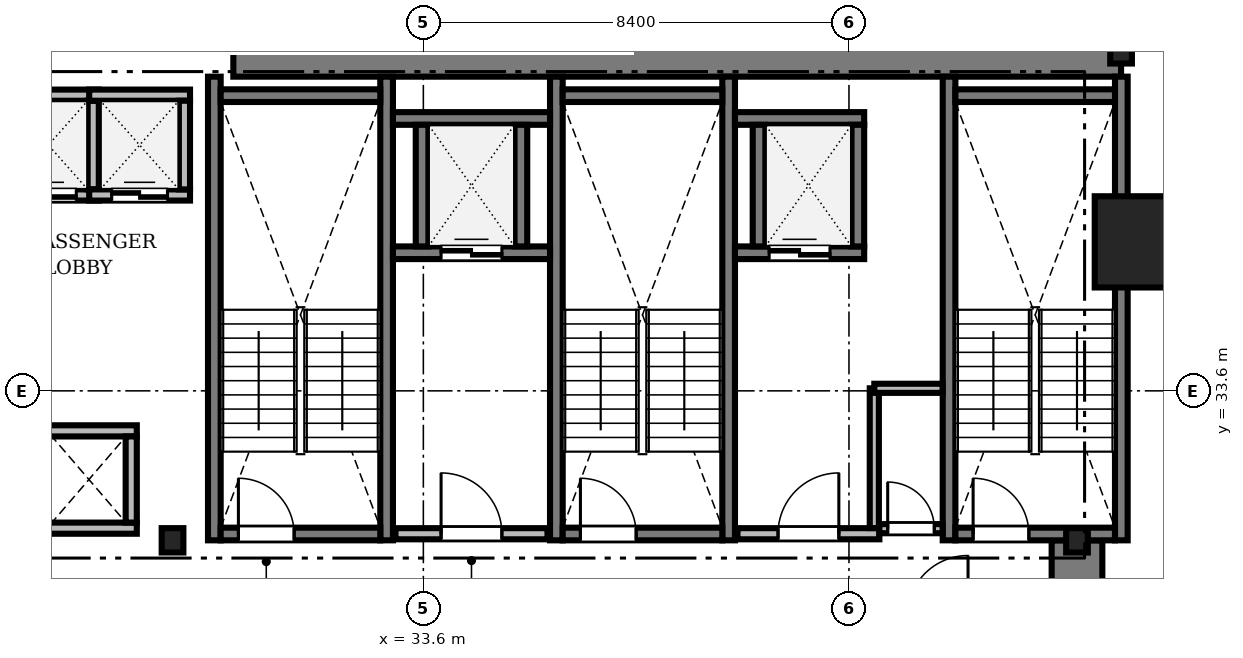
"""IFC4 building model, lengths in metres.
Left out: names, types, materials, properties, quantities, classifications, styles, units other than length and angle.
Written with IfcOpenShell. Run it as: python <this file> out.ifc"""

import sys

from ifc_helpers import new_model, si_unit, direction, frame, frame_2d, origin, origin_2d, place, context, subcontext, project, spatial, rectangle, i_section, extrude, source, transform, mapped, element, fill, save


model = new_model("IFC4")
c1 = context("Model", 3, precision=1e-05, world=origin(), true_north=direction((0.0, 1.0)))
c2 = subcontext(c1, "Body", "Model", "MODEL_VIEW")
j1 = project(units=[si_unit("LENGTHUNIT", "METRE"), si_unit("PLANEANGLEUNIT", "RADIAN")], contexts=[c1])
p1 = place(None, origin())
s1 = spatial("IfcSite", under=j1, at=p1, CompositionType="ELEMENT")
p2 = place(p1, origin())
s2 = spatial("IfcBuilding", under=s1, at=p2, CompositionType="ELEMENT")
p3 = place(p2, frame((0.0, 0.0, 71.4)))
s3 = spatial("IfcBuildingStorey", under=s2, at=p3, CompositionType="ELEMENT", Elevation=71.4)
m1 = source(origin(), c2, "Body", "SweptSolid", [
    extrude(rectangle(XDim=17.52, YDim=1.0, at=frame_2d((8.76, 0.0))), origin(), (0.0, 0.0, 1.0), 3.41),
])
p4 = place(p3, frame((29.85, 40.3, 0.0), z_axis=(0.0, 0.0, 1.0), x_axis=(1.0, 0.0, 0.0)))
e1 = element("IfcWall", 1, at=p4, inside=s3, PredefinedType="SHEAR", context=c2, shape_type="MappedRepresentation", body=[
    mapped(m1, transform((0.0, 0.0, 0.0), scale=1.0)),
])
m2 = source(origin(), c2, "Body", "SweptSolid", [
    extrude(rectangle(XDim=13.15, YDim=1.0, at=frame_2d((6.575, 0.0))), origin(), (0.0, 0.0, 1.0), 3.41),
])
p5 = place(p3, frame((46.5, 17.5, 0.0), z_axis=(0.0, 0.0, 1.0), x_axis=(0.0, 1.0, 0.0)))
e2 = element("IfcWall", 2, at=p5, inside=s3, PredefinedType="SHEAR", context=c2, shape_type="MappedRepresentation", body=[
    mapped(m2, transform((0.0, 0.0, 0.0), scale=1.0)),
])
m3 = source(origin(), c2, "Body", "SweptSolid", [
    extrude(i_section(OverallWidth=0.428, OverallDepth=0.481, WebThickness=0.04, FlangeThickness=0.063, FilletRadius=0.015, at=origin_2d()), origin(), (0.0, 0.0, 1.0), 3.41),
])
for number, where, z_axis, x_axis in (
    (3, (28.65, 30.65, 0.0), (0.0, 0.0, 1.0), (1.0, 0.0, 0.0)),
    (4, (46.5, 30.65, 0.0), (0.0, 0.0, 1.0), (1.0, 0.0, 0.0)),
    (5, (47.37, 40.3, 0.0), (0.0, 0.0, 1.0), (1.0, 0.0, 0.0)),
):
    element("IfcColumn", number, at=place(p3, frame(where, z_axis=z_axis, x_axis=x_axis)), inside=s3, PredefinedType="COLUMN", context=c2, shape_type="MappedRepresentation", body=[
        mapped(m3, transform((0.0, 0.0, 0.0), scale=1.0)),
    ])
m4 = source(origin(), c2, "Body", "SweptSolid", [
    extrude(rectangle(XDim=1.8, YDim=1.8, at=origin_2d()), origin(), (0.0, 0.0, 1.0), 3.41),
])
p6 = place(p3, frame((47.75, 36.54, 0.0), z_axis=(0.0, 0.0, 1.0), x_axis=(1.0, 0.0, 0.0)))
e6 = element("IfcColumn", 6, at=p6, inside=s3, PredefinedType="COLUMN", context=c2, shape_type="MappedRepresentation", body=[
    mapped(m4, transform((0.0, 0.0, 0.0), scale=1.0)),
])
m5 = source(origin(), c2, "Body", "SweptSolid", [
    extrude(rectangle(XDim=9.15, YDim=0.25, at=frame_2d((4.575, 0.0))), origin(), (0.0, 0.0, 1.0), 3.45),
])
for number, where, z_axis, x_axis in (
    (7, (29.475, 30.65, 0.0), (0.0, 0.0, 1.0), (0.0, 1.0, 0.0)),
    (8, (32.875, 30.65, 0.0), (0.0, 0.0, 1.0), (0.0, 1.0, 0.0)),
):
    element("IfcWall", number, at=place(p3, frame(where, z_axis=z_axis, x_axis=x_axis)), inside=s3, PredefinedType="SOLIDWALL", context=c2, shape_type="MappedRepresentation", body=[
        mapped(m5, transform((0.0, 0.0, 0.0), scale=1.0)),
    ])
m6 = source(origin(), c2, "Body", "SweptSolid", [
    extrude(rectangle(XDim=3.15, YDim=0.25, at=frame_2d((1.575, 0.0))), origin(), (0.0, 0.0, 1.0), 3.45),
])
p7 = place(p3, frame((29.6, 39.425, 0.0), z_axis=(0.0, 0.0, 1.0), x_axis=(1.0, 0.0, 0.0)))
e9 = element("IfcWall", 9, at=p7, inside=s3, PredefinedType="SOLIDWALL", context=c2, shape_type="MappedRepresentation", body=[
    mapped(m6, transform((0.0, 0.0, 0.0), scale=1.0)),
])
p8 = place(p3, frame((29.6, 30.775, 0.0), z_axis=(0.0, 0.0, 1.0), x_axis=(1.0, 0.0, 0.0)))
e10 = element("IfcWall", 10, at=p8, inside=s3, PredefinedType="SOLIDWALL", context=c2, shape_type="MappedRepresentation", body=[
    mapped(m6, transform((0.0, 0.0, 0.0), scale=1.0)),
])
m7 = source(origin(), c2, "Body", "SweptSolid", [
    extrude(rectangle(XDim=1.1, YDim=2.2, at=frame_2d((0.55, 1.1))), frame((0.0, 0.135, 0.0), z_axis=(0.0, -1.0, 0.0), x_axis=(1.0, 0.0, 0.0)), (0.0, 0.0, 1.0), 0.27),
])
p9 = place(p8, frame((0.35, 0.0, 0.0)))
e11 = element("IfcOpeningElement", 11, at=p9, cuts=e10, PredefinedType="OPENING", context=c2, shape_type="MappedRepresentation", body=[
    mapped(m7, transform((0.0, 0.0, 0.0), scale=1.0)),
])
for number, where, z_axis, x_axis in (
    (12, (36.225, 30.65, 0.0), (0.0, 0.0, 1.0), (0.0, 1.0, 0.0)),
    (13, (39.625, 30.65, 0.0), (0.0, 0.0, 1.0), (0.0, 1.0, 0.0)),
):
    element("IfcWall", number, at=place(p3, frame(where, z_axis=z_axis, x_axis=x_axis)), inside=s3, PredefinedType="SOLIDWALL", context=c2, shape_type="MappedRepresentation", body=[
        mapped(m5, transform((0.0, 0.0, 0.0), scale=1.0)),
    ])
p10 = place(p3, frame((36.35, 39.425, 0.0), z_axis=(0.0, 0.0, 1.0), x_axis=(1.0, 0.0, 0.0)))
e14 = element("IfcWall", 14, at=p10, inside=s3, PredefinedType="SOLIDWALL", context=c2, shape_type="MappedRepresentation", body=[
    mapped(m6, transform((0.0, 0.0, 0.0), scale=1.0)),
])
p11 = place(p3, frame((36.35, 30.775, 0.0), z_axis=(0.0, 0.0, 1.0), x_axis=(1.0, 0.0, 0.0)))
e15 = element("IfcWall", 15, at=p11, inside=s3, PredefinedType="SOLIDWALL", context=c2, shape_type="MappedRepresentation", body=[
    mapped(m6, transform((0.0, 0.0, 0.0), scale=1.0)),
])
p12 = place(p11, frame((0.35, 0.0, 0.0)))
e16 = element("IfcOpeningElement", 16, at=p12, cuts=e15, PredefinedType="OPENING", context=c2, shape_type="MappedRepresentation", body=[
    mapped(m7, transform((0.0, 0.0, 0.0), scale=1.0)),
])
for number, where, z_axis, x_axis in (
    (17, (43.975, 30.65, 0.0), (0.0, 0.0, 1.0), (0.0, 1.0, 0.0)),
    (18, (47.375, 30.65, 0.0), (0.0, 0.0, 1.0), (0.0, 1.0, 0.0)),
):
    element("IfcWall", number, at=place(p3, frame(where, z_axis=z_axis, x_axis=x_axis)), inside=s3, PredefinedType="SOLIDWALL", context=c2, shape_type="MappedRepresentation", body=[
        mapped(m5, transform((0.0, 0.0, 0.0), scale=1.0)),
    ])
p13 = place(p3, frame((44.1, 39.425, 0.0), z_axis=(0.0, 0.0, 1.0), x_axis=(1.0, 0.0, 0.0)))
e19 = element("IfcWall", 19, at=p13, inside=s3, PredefinedType="SOLIDWALL", context=c2, shape_type="MappedRepresentation", body=[
    mapped(m6, transform((0.0, 0.0, 0.0), scale=1.0)),
])
p14 = place(p3, frame((44.1, 30.775, 0.0), z_axis=(0.0, 0.0, 1.0), x_axis=(1.0, 0.0, 0.0)))
e20 = element("IfcWall", 20, at=p14, inside=s3, PredefinedType="SOLIDWALL", context=c2, shape_type="MappedRepresentation", body=[
    mapped(m6, transform((0.0, 0.0, 0.0), scale=1.0)),
])
p15 = place(p14, frame((0.35, 0.0, 0.0)))
e21 = element("IfcOpeningElement", 21, at=p15, cuts=e20, PredefinedType="OPENING", context=c2, shape_type="MappedRepresentation", body=[
    mapped(m7, transform((0.0, 0.0, 0.0), scale=1.0)),
])
m8 = source(origin(), c2, "Body", "SweptSolid", [
    extrude(rectangle(XDim=3.0, YDim=0.22, at=frame_2d((1.5, 0.0))), origin(), (0.0, 0.0, 1.0), 3.41),
])
p16 = place(p3, frame((33.05, 30.78, 0.0), z_axis=(0.0, 0.0, 1.0), x_axis=(1.0, 0.0, 0.0)))
e22 = element("IfcWall", 22, at=p16, inside=s3, PredefinedType="SOLIDWALL", context=c2, shape_type="MappedRepresentation", body=[
    mapped(m8, transform((0.0, 0.0, 0.0), scale=1.0)),
])
m9 = source(origin(), c2, "Body", "SweptSolid", [
    extrude(rectangle(XDim=1.2, YDim=2.2, at=frame_2d((0.6, 1.1))), frame((0.0, 0.12, 0.0), z_axis=(0.0, -1.0, 0.0), x_axis=(1.0, 0.0, 0.0)), (0.0, 0.0, 1.0), 0.24),
])
p17 = place(p16, frame((0.9, 0.0, 0.0)))
e23 = element("IfcOpeningElement", 23, at=p17, cuts=e22, PredefinedType="OPENING", context=c2, shape_type="MappedRepresentation", body=[
    mapped(m9, transform((0.0, 0.0, 0.0), scale=1.0)),
])
m10 = source(origin(), c2, "Body", "SweptSolid", [
    extrude(rectangle(XDim=2.8, YDim=0.22, at=frame_2d((1.4, 0.0))), origin(), (0.0, 0.0, 1.0), 3.41),
])
p18 = place(p3, frame((39.8, 30.78, 0.0), z_axis=(0.0, 0.0, 1.0), x_axis=(1.0, 0.0, 0.0)))
e24 = element("IfcWall", 24, at=p18, inside=s3, PredefinedType="SOLIDWALL", context=c2, shape_type="MappedRepresentation", body=[
    mapped(m10, transform((0.0, 0.0, 0.0), scale=1.0)),
])
p19 = place(p18, frame((0.8, 0.0, 0.0)))
e25 = element("IfcOpeningElement", 25, at=p19, cuts=e24, PredefinedType="OPENING", context=c2, shape_type="MappedRepresentation", body=[
    mapped(m9, transform((0.0, 0.0, 0.0), scale=1.0)),
])
m11 = source(origin(), c2, "Body", "SweptSolid", [
    extrude(rectangle(XDim=1.99, YDim=0.22, at=frame_2d((0.995, 0.0))), origin(), (0.0, 0.0, 1.0), 3.41),
])
p20 = place(p3, frame((25.205, 37.465, 0.0), z_axis=(0.0, 0.0, 1.0), x_axis=(1.0, 0.0, 0.0)))
e26 = element("IfcWall", 26, at=p20, inside=s3, PredefinedType="SOLIDWALL", context=c2, shape_type="MappedRepresentation", body=[
    mapped(m11, transform((0.0, 0.0, 0.0), scale=1.0)),
])
m12 = source(origin(), c2, "Body", "SweptSolid", [
    extrude(rectangle(XDim=1.1, YDim=2.2, at=frame_2d((0.55, 1.1))), frame((0.0, 0.12, 0.0), z_axis=(0.0, -1.0, 0.0), x_axis=(1.0, 0.0, 0.0)), (0.0, 0.0, 1.0), 0.24),
])
p21 = place(p20, frame((0.445, 0.0, 0.0)))
e27 = element("IfcOpeningElement", 27, at=p21, cuts=e26, PredefinedType="OPENING", context=c2, shape_type="MappedRepresentation", body=[
    mapped(m12, transform((0.0, 0.0, 0.0), scale=1.0)),
])
p22 = place(p3, frame((25.205, 39.435, 0.0), z_axis=(0.0, 0.0, 1.0), x_axis=(1.0, 0.0, 0.0)))
e28 = element("IfcWall", 28, at=p22, inside=s3, PredefinedType="SOLIDWALL", context=c2, shape_type="MappedRepresentation", body=[
    mapped(m11, transform((0.0, 0.0, 0.0), scale=1.0)),
])
m13 = source(origin(), c2, "Body", "SweptSolid", [
    extrude(rectangle(XDim=1.75, YDim=0.22, at=frame_2d((0.875, 0.0))), origin(), (0.0, 0.0, 1.0), 3.41),
])
p23 = place(p3, frame((27.085, 37.575, 0.0), z_axis=(0.0, 0.0, 1.0), x_axis=(0.0, 1.0, 0.0)))
e29 = element("IfcWall", 29, at=p23, inside=s3, PredefinedType="SOLIDWALL", context=c2, shape_type="MappedRepresentation", body=[
    mapped(m13, transform((0.0, 0.0, 0.0), scale=1.0)),
])
m14 = source(origin(), c2, "Body", "SweptSolid", [
    extrude(rectangle(XDim=1.99, YDim=0.22, at=frame_2d((0.995, 0.0))), origin(), (0.0, 0.0, 1.0), 3.41),
])
p24 = place(p3, frame((27.005, 37.465, 0.0), z_axis=(0.0, 0.0, 1.0), x_axis=(1.0, 0.0, 0.0)))
e30 = element("IfcWall", 30, at=p24, inside=s3, PredefinedType="SOLIDWALL", context=c2, shape_type="MappedRepresentation", body=[
    mapped(m14, transform((0.0, 0.0, 0.0), scale=1.0)),
])
p25 = place(p24, frame((0.445, 0.0, 0.0)))
e31 = element("IfcOpeningElement", 31, at=p25, cuts=e30, PredefinedType="OPENING", context=c2, shape_type="MappedRepresentation", body=[
    mapped(m12, transform((0.0, 0.0, 0.0), scale=1.0)),
])
p26 = place(p3, frame((27.005, 39.435, 0.0), z_axis=(0.0, 0.0, 1.0), x_axis=(1.0, 0.0, 0.0)))
e32 = element("IfcWall", 32, at=p26, inside=s3, PredefinedType="SOLIDWALL", context=c2, shape_type="MappedRepresentation", body=[
    mapped(m14, transform((0.0, 0.0, 0.0), scale=1.0)),
])
p27 = place(p3, frame((28.885, 37.575, 0.0), z_axis=(0.0, 0.0, 1.0), x_axis=(0.0, 1.0, 0.0)))
e33 = element("IfcWall", 33, at=p27, inside=s3, PredefinedType="SOLIDWALL", context=c2, shape_type="MappedRepresentation", body=[
    mapped(m13, transform((0.0, 0.0, 0.0), scale=1.0)),
])
m15 = source(origin(), c2, "Body", "SweptSolid", [
    extrude(rectangle(XDim=3.1, YDim=0.25, at=frame_2d((1.55, 0.0))), origin(), (0.0, 0.0, 1.0), 3.41),
])
p28 = place(p3, frame((33.0, 36.325, 0.0), z_axis=(0.0, 0.0, 1.0), x_axis=(1.0, 0.0, 0.0)))
e34 = element("IfcWall", 34, at=p28, inside=s3, PredefinedType="SOLIDWALL", context=c2, shape_type="MappedRepresentation", body=[
    mapped(m15, transform((0.0, 0.0, 0.0), scale=1.0)),
])
m16 = source(origin(), c2, "Body", "SweptSolid", [
    extrude(rectangle(XDim=1.2, YDim=2.25, at=frame_2d((0.6, 1.125))), frame((0.0, 0.135, 0.0), z_axis=(0.0, -1.0, 0.0), x_axis=(1.0, 0.0, 0.0)), (0.0, 0.0, 1.0), 0.27),
])
p29 = place(p28, frame((0.95, 0.0, 0.0)))
e35 = element("IfcOpeningElement", 35, at=p29, cuts=e34, PredefinedType="OPENING", context=c2, shape_type="MappedRepresentation", body=[
    mapped(m16, transform((0.0, 0.0, 0.0), scale=1.0)),
])
p30 = place(p3, frame((33.0, 38.975, 0.0), z_axis=(0.0, 0.0, 1.0), x_axis=(1.0, 0.0, 0.0)))
e36 = element("IfcWall", 36, at=p30, inside=s3, PredefinedType="SOLIDWALL", context=c2, shape_type="MappedRepresentation", body=[
    mapped(m15, transform((0.0, 0.0, 0.0), scale=1.0)),
])
m17 = source(origin(), c2, "Body", "SweptSolid", [
    extrude(rectangle(XDim=2.4, YDim=0.25, at=frame_2d((1.2, 0.0))), origin(), (0.0, 0.0, 1.0), 3.41),
])
for number, where, z_axis, x_axis in (
    (37, (33.575, 36.45, 0.0), (0.0, 0.0, 1.0), (0.0, 1.0, 0.0)),
    (38, (35.525, 36.45, 0.0), (0.0, 0.0, 1.0), (0.0, 1.0, 0.0)),
):
    element("IfcWall", number, at=place(p3, frame(where, z_axis=z_axis, x_axis=x_axis)), inside=s3, PredefinedType="SOLIDWALL", context=c2, shape_type="MappedRepresentation", body=[
        mapped(m17, transform((0.0, 0.0, 0.0), scale=1.0)),
    ])
m18 = source(origin(), c2, "Body", "SweptSolid", [
    extrude(rectangle(XDim=2.55, YDim=0.25, at=frame_2d((1.275, 0.0))), origin(), (0.0, 0.0, 1.0), 3.41),
])
p31 = place(p3, frame((39.75, 36.325, 0.0), z_axis=(0.0, 0.0, 1.0), x_axis=(1.0, 0.0, 0.0)))
e39 = element("IfcWall", 39, at=p31, inside=s3, PredefinedType="SOLIDWALL", context=c2, shape_type="MappedRepresentation", body=[
    mapped(m18, transform((0.0, 0.0, 0.0), scale=1.0)),
])
p32 = place(p31, frame((0.675, 0.0, 0.0)))
e40 = element("IfcOpeningElement", 40, at=p32, cuts=e39, PredefinedType="OPENING", context=c2, shape_type="MappedRepresentation", body=[
    mapped(m16, transform((0.0, 0.0, 0.0), scale=1.0)),
])
p33 = place(p3, frame((39.75, 38.975, 0.0), z_axis=(0.0, 0.0, 1.0), x_axis=(1.0, 0.0, 0.0)))
e41 = element("IfcWall", 41, at=p33, inside=s3, PredefinedType="SOLIDWALL", context=c2, shape_type="MappedRepresentation", body=[
    mapped(m18, transform((0.0, 0.0, 0.0), scale=1.0)),
])
for number, where, z_axis, x_axis in (
    (42, (40.225, 36.45, 0.0), (0.0, 0.0, 1.0), (0.0, 1.0, 0.0)),
    (43, (42.175, 36.45, 0.0), (0.0, 0.0, 1.0), (0.0, 1.0, 0.0)),
):
    element("IfcWall", number, at=place(p3, frame(where, z_axis=z_axis, x_axis=x_axis)), inside=s3, PredefinedType="SOLIDWALL", context=c2, shape_type="MappedRepresentation", body=[
        mapped(m17, transform((0.0, 0.0, 0.0), scale=1.0)),
    ])
m19 = source(origin(), c2, "Body", "SweptSolid", [
    extrude(rectangle(XDim=1.89, YDim=0.22, at=frame_2d((0.945, 0.0))), origin(), (0.0, 0.0, 1.0), 3.41),
])
for number, where, z_axis, x_axis in (
    (44, (26.055, 30.89, 0.0), (0.0, 0.0, 1.0), (1.0, 0.0, 0.0)),
    (45, (26.055, 32.81, 0.0), (0.0, 0.0, 1.0), (1.0, 0.0, 0.0)),
):
    element("IfcWall", number, at=place(p3, frame(where, z_axis=z_axis, x_axis=x_axis)), inside=s3, PredefinedType="SOLIDWALL", context=c2, shape_type="MappedRepresentation", body=[
        mapped(m19, transform((0.0, 0.0, 0.0), scale=1.0)),
    ])
m20 = source(origin(), c2, "Body", "SweptSolid", [
    extrude(rectangle(XDim=1.7, YDim=0.22, at=frame_2d((0.85, 0.0))), origin(), (0.0, 0.0, 1.0), 3.41),
])
p34 = place(p3, frame((27.835, 31.0, 0.0), z_axis=(0.0, 0.0, 1.0), x_axis=(0.0, 1.0, 0.0)))
e46 = element("IfcWall", 46, at=p34, inside=s3, PredefinedType="SOLIDWALL", context=c2, shape_type="MappedRepresentation", body=[
    mapped(m20, transform((0.0, 0.0, 0.0), scale=1.0)),
])
m21 = source(origin(), c2, "Body", "SweptSolid", [
    extrude(rectangle(XDim=1.248, YDim=0.18, at=frame_2d((0.624, 0.0))), origin(), (0.0, 0.0, 1.0), 3.41),
])
p35 = place(p3, frame((42.6, 30.88, 0.0), z_axis=(0.0, 0.0, 1.0), x_axis=(1.0, 0.0, 0.0)))
e47 = element("IfcWall", 47, at=p35, inside=s3, PredefinedType="PARTITIONING", context=c2, shape_type="MappedRepresentation", body=[
    mapped(m21, transform((0.0, 0.0, 0.0), scale=1.0)),
])
m22 = source(origin(), c2, "Body", "SweptSolid", [
    extrude(rectangle(XDim=0.92, YDim=2.1, at=frame_2d((0.46, 1.05))), frame((0.0, 0.1, 0.0), z_axis=(0.0, -1.0, 0.0), x_axis=(1.0, 0.0, 0.0)), (0.0, 0.0, 1.0), 0.2),
])
p36 = place(p35, frame((0.164, 0.0, 0.0)))
e48 = element("IfcOpeningElement", 48, at=p36, cuts=e47, PredefinedType="OPENING", context=c2, shape_type="MappedRepresentation", body=[
    mapped(m22, transform((0.0, 0.0, 0.0), scale=1.0)),
])
m23 = source(origin(), c2, "Body", "SweptSolid", [
    extrude(rectangle(XDim=2.758, YDim=0.18, at=frame_2d((1.379, 0.0))), origin(), (0.0, 0.0, 1.0), 3.41),
])
p37 = place(p3, frame((42.5, 30.892, 0.0), z_axis=(0.0, 0.0, 1.0), x_axis=(0.0, 1.0, 0.0)))
e49 = element("IfcWall", 49, at=p37, inside=s3, PredefinedType="PARTITIONING", context=c2, shape_type="MappedRepresentation", body=[
    mapped(m23, transform((0.0, 0.0, 0.0), scale=1.0)),
])
m24 = source(origin(), c2, "Body", "SweptSolid", [
    extrude(rectangle(XDim=1.348, YDim=0.18, at=frame_2d((0.674, 0.0))), origin(), (0.0, 0.0, 1.0), 3.41),
])
p38 = place(p3, frame((42.5, 33.65, 0.0), z_axis=(0.0, 0.0, 1.0), x_axis=(1.0, 0.0, 0.0)))
e50 = element("IfcWall", 50, at=p38, inside=s3, PredefinedType="PARTITIONING", context=c2, shape_type="MappedRepresentation", body=[
    mapped(m24, transform((0.0, 0.0, 0.0), scale=1.0)),
])
m25 = source(origin(), c2, "Body", "SweptSolid", [
    extrude(rectangle(XDim=1.1, YDim=2.2, at=frame_2d((0.55, 1.1))), frame((0.0, 0.025, 0.0), z_axis=(0.0, -1.0, 0.0), x_axis=(1.0, 0.0, 0.0)), (0.0, 0.0, 1.0), 0.05),
])
p39 = place(p9, origin())
e51 = element("IfcDoor", 51, at=p39, inside=s3, OperationType="SINGLE_SWING_LEFT", PredefinedType="DOOR", context=c2, shape_type="MappedRepresentation", body=[
    mapped(m25, transform((0.0, 0.0, 0.0), scale=1.0)),
])
fill(e11, e51)
p40 = place(p12, origin())
e52 = element("IfcDoor", 52, at=p40, inside=s3, OperationType="SINGLE_SWING_LEFT", PredefinedType="DOOR", context=c2, shape_type="MappedRepresentation", body=[
    mapped(m25, transform((0.0, 0.0, 0.0), scale=1.0)),
])
fill(e16, e52)
p41 = place(p15, origin())
e53 = element("IfcDoor", 53, at=p41, inside=s3, OperationType="SINGLE_SWING_LEFT", PredefinedType="DOOR", context=c2, shape_type="MappedRepresentation", body=[
    mapped(m25, transform((0.0, 0.0, 0.0), scale=1.0)),
])
fill(e21, e53)
m26 = source(origin(), c2, "Body", "SweptSolid", [
    extrude(rectangle(XDim=1.2, YDim=2.2, at=frame_2d((0.6, 1.1))), frame((0.0, 0.025, 0.0), z_axis=(0.0, -1.0, 0.0), x_axis=(1.0, 0.0, 0.0)), (0.0, 0.0, 1.0), 0.05),
])
p42 = place(p17, origin())
e54 = element("IfcDoor", 54, at=p42, inside=s3, OperationType="SINGLE_SWING_LEFT", PredefinedType="DOOR", context=c2, shape_type="MappedRepresentation", body=[
    mapped(m26, transform((0.0, 0.0, 0.0), scale=1.0)),
])
fill(e23, e54)
p43 = place(p19, origin())
e55 = element("IfcDoor", 55, at=p43, inside=s3, OperationType="SINGLE_SWING_RIGHT", PredefinedType="DOOR", context=c2, shape_type="MappedRepresentation", body=[
    mapped(m26, transform((0.0, 0.0, 0.0), scale=1.0)),
])
fill(e25, e55)
p44 = place(p21, origin())
e56 = element("IfcDoor", 56, at=p44, inside=s3, OperationType="DOUBLE_DOOR_SLIDING", PredefinedType="DOOR", context=c2, shape_type="MappedRepresentation", body=[
    mapped(m25, transform((0.0, 0.0, 0.0), scale=1.0)),
])
fill(e27, e56)
p45 = place(p25, origin())
e57 = element("IfcDoor", 57, at=p45, inside=s3, OperationType="DOUBLE_DOOR_SLIDING", PredefinedType="DOOR", context=c2, shape_type="MappedRepresentation", body=[
    mapped(m25, transform((0.0, 0.0, 0.0), scale=1.0)),
])
fill(e31, e57)
m27 = source(origin(), c2, "Body", "SweptSolid", [
    extrude(rectangle(XDim=1.2, YDim=2.25, at=frame_2d((0.6, 1.125))), frame((0.0, 0.025, 0.0), z_axis=(0.0, -1.0, 0.0), x_axis=(1.0, 0.0, 0.0)), (0.0, 0.0, 1.0), 0.05),
])
p46 = place(p29, origin())
e58 = element("IfcDoor", 58, at=p46, inside=s3, OperationType="DOUBLE_DOOR_SLIDING", PredefinedType="DOOR", context=c2, shape_type="MappedRepresentation", body=[
    mapped(m27, transform((0.0, 0.0, 0.0), scale=1.0)),
])
fill(e35, e58)
p47 = place(p32, origin())
e59 = element("IfcDoor", 59, at=p47, inside=s3, OperationType="DOUBLE_DOOR_SLIDING", PredefinedType="DOOR", context=c2, shape_type="MappedRepresentation", body=[
    mapped(m27, transform((0.0, 0.0, 0.0), scale=1.0)),
])
fill(e40, e59)
m28 = source(origin(), c2, "Body", "SweptSolid", [
    extrude(rectangle(XDim=0.92, YDim=2.1, at=frame_2d((0.46, 1.05))), frame((0.0, 0.025, 0.0), z_axis=(0.0, -1.0, 0.0), x_axis=(1.0, 0.0, 0.0)), (0.0, 0.0, 1.0), 0.05),
])
p48 = place(p36, origin())
e60 = element("IfcDoor", 60, at=p48, inside=s3, OperationType="SINGLE_SWING_LEFT", PredefinedType="DOOR", context=c2, shape_type="MappedRepresentation", body=[
    mapped(m28, transform((0.0, 0.0, 0.0), scale=1.0)),
])
fill(e48, e60)
save(model, sys.argv[1])
